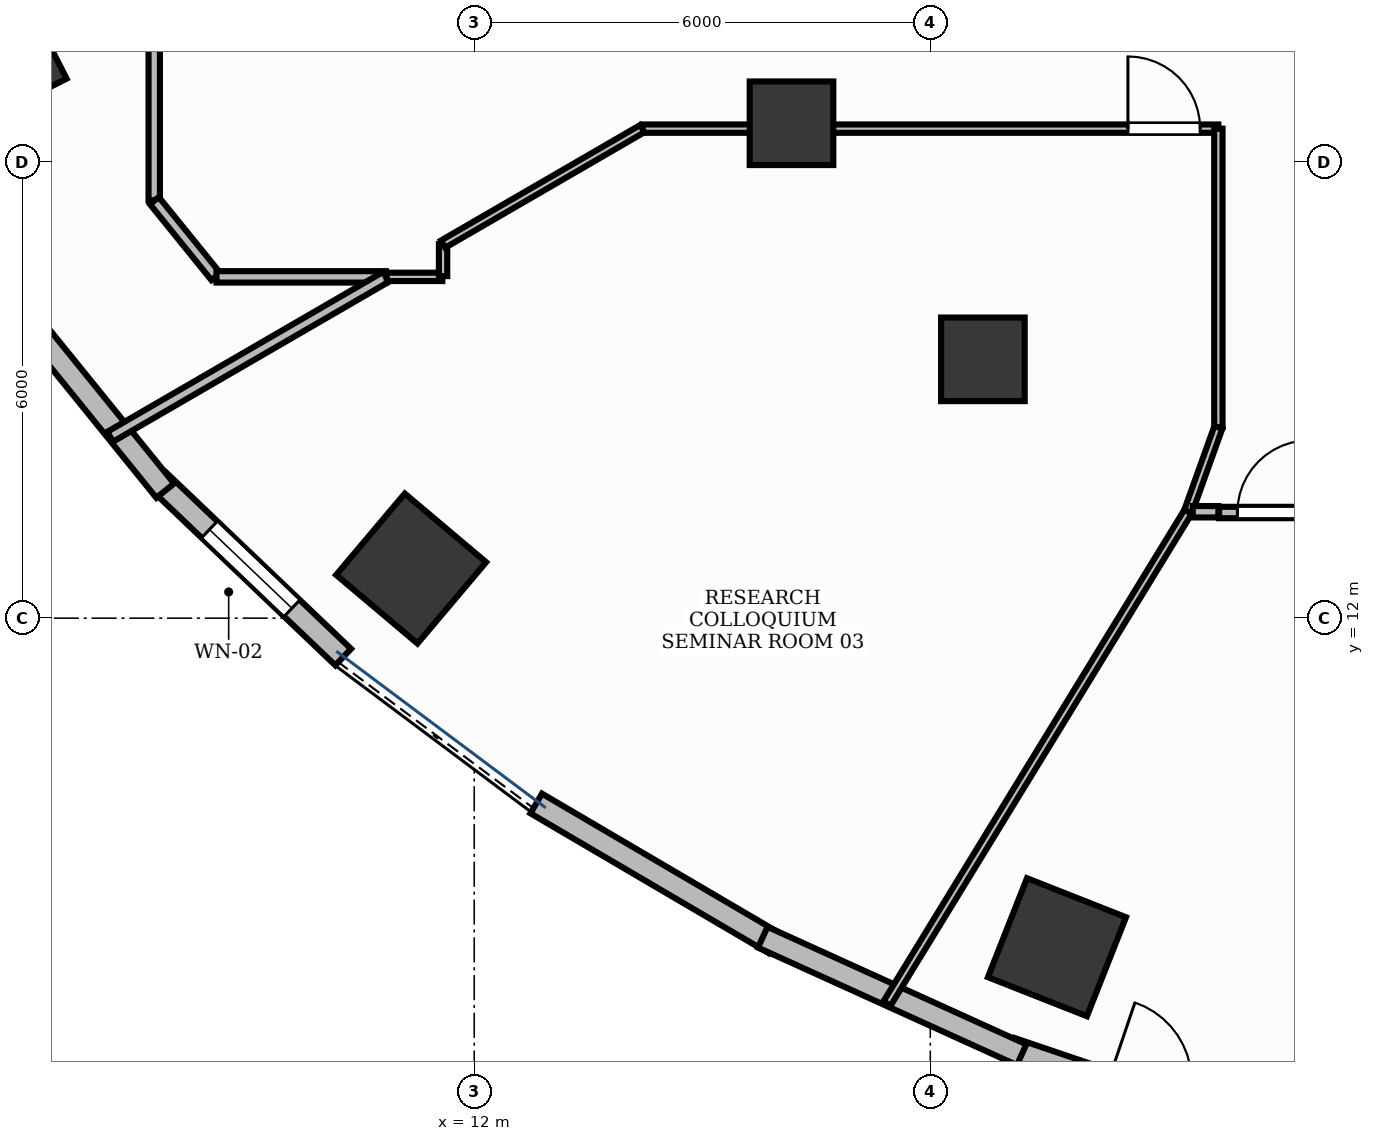
"""IFC4 building model, lengths in metres.
Left out: names, types, materials, properties, quantities, classifications, styles, units other than length and angle.
Written with IfcOpenShell. Run it as: python <this file> out.ifc"""

import sys

from ifc_helpers import new_model, si_unit, direction, frame, frame_2d, origin, origin_2d, place, context, subcontext, project, spatial, rectangle, extrude, element, fill, save


model = new_model("IFC4")
c1 = context("Model", 3, precision=1e-05, world=origin(), true_north=direction((0.0, 1.0)))
c2 = subcontext(c1, "Body", "Model", "MODEL_VIEW")
j1 = project(units=[si_unit("LENGTHUNIT", "METRE"), si_unit("PLANEANGLEUNIT", "RADIAN")], contexts=[c1])
p1 = place(None, origin())
s1 = spatial("IfcSite", under=j1, at=p1, CompositionType="ELEMENT")
p2 = place(p1, origin())
s2 = spatial("IfcBuilding", under=s1, at=p2, CompositionType="ELEMENT")
p3 = place(p2, frame((0.0, 0.0, 72.0)))
s3 = spatial("IfcBuildingStorey", under=s2, at=p3, CompositionType="ELEMENT", Elevation=72.0)
p4 = place(p3, frame((5.696, 19.404, -0.0), z_axis=(0.0, 0.0, 1.0), x_axis=(-0.453057191132, 0.891481453292, 0.0)))
e1 = element("IfcColumn", 1, at=p4, inside=s3, PredefinedType="COLUMN", context=c2, shape_type="SweptSolid", body=[
    extrude(rectangle(XDim=1.4, YDim=1.4, at=origin_2d()), origin(), (0.0, 0.0, 1.0), 3.901),
])
p5 = place(p3, frame((16.174, 18.511, -0.0), z_axis=(0.0, 0.0, 1.0), x_axis=(1.0, 0.0, 0.0)))
e2 = element("IfcColumn", 2, at=p5, inside=s3, PredefinedType="COLUMN", context=c2, shape_type="SweptSolid", body=[
    extrude(rectangle(XDim=1.1, YDim=1.1, at=origin_2d()), origin(), (0.0, 0.0, 1.0), 3.901),
])
p6 = place(p3, frame((11.17, 12.653, -0.0), z_axis=(0.0, 0.0, 1.0), x_axis=(-0.764246456939, 0.644924300253, 0.0)))
e3 = element("IfcColumn", 3, at=p6, inside=s3, PredefinedType="COLUMN", context=c2, shape_type="SweptSolid", body=[
    extrude(rectangle(XDim=1.4, YDim=1.4, at=origin_2d()), origin(), (0.0, 0.0, 1.0), 3.901),
])
p7 = place(p3, frame((18.692, 15.405, -0.0), z_axis=(0.0, 0.0, 1.0), x_axis=(1.0, 0.0, 0.0)))
e4 = element("IfcColumn", 4, at=p7, inside=s3, PredefinedType="COLUMN", context=c2, shape_type="SweptSolid", body=[
    extrude(rectangle(XDim=1.1, YDim=1.1, at=origin_2d()), origin(), (0.0, 0.0, 1.0), 3.901),
])
p8 = place(p3, frame((19.667, 7.671, -0.0), z_axis=(0.0, 0.0, 1.0), x_axis=(-0.930225540858, 0.366988341962, 0.0)))
e5 = element("IfcColumn", 5, at=p8, inside=s3, PredefinedType="COLUMN", context=c2, shape_type="SweptSolid", body=[
    extrude(rectangle(XDim=1.4, YDim=1.4, at=origin_2d()), origin(), (0.0, 0.0, 1.0), 3.901),
])
p9 = place(p3, frame((7.842, 13.809, 0.0), z_axis=(0.0, 0.0, 1.0), x_axis=(0.723678516117, -0.690137236578, 0.0)))
e6 = element("IfcWall", 6, at=p9, inside=s3, PredefinedType="STANDARD", context=c2, shape_type="SweptSolid", body=[
    extrude(rectangle(XDim=3.363, YDim=0.3, at=frame_2d((1.681, 0.0))), origin(), (0.0, 0.0, 1.0), 3.9),
])
p10 = place(p9, frame((0.931, 0.0, 0.95)))
e7 = element("IfcOpeningElement", 7, at=p10, cuts=e6, PredefinedType="OPENING", context=c2, shape_type="SweptSolid", body=[
    extrude(rectangle(XDim=1.5, YDim=1.8, at=frame_2d((0.75, 0.9))), frame((0.0, 0.165, 0.0), z_axis=(0.0, -1.0, 0.0), x_axis=(1.0, 0.0, 0.0)), (0.0, 0.0, 1.0), 0.33),
])
p11 = place(p3, frame((19.065, 6.333, 0.0), z_axis=(0.0, 0.0, 1.0), x_axis=(0.947034337234, -0.321132315564, 0.0)))
e8 = element("IfcWall", 8, at=p11, inside=s3, PredefinedType="STANDARD", context=c2, shape_type="SweptSolid", body=[
    extrude(rectangle(XDim=3.79, YDim=0.3, at=frame_2d((1.895, 0.0))), origin(), (0.0, 0.0, 1.0), 3.47),
])
p12 = place(p11, frame((1.345, 0.0, 0.0)))
e9 = element("IfcOpeningElement", 9, at=p12, cuts=e8, PredefinedType="OPENING", context=c2, shape_type="SweptSolid", body=[
    extrude(rectangle(XDim=1.1, YDim=2.15, at=frame_2d((0.55, 1.075))), frame((0.0, 0.165, 0.0), z_axis=(0.0, -1.0, 0.0), x_axis=(1.0, 0.0, 0.0)), (0.0, 0.0, 1.0), 0.33),
])
p13 = place(p3, frame((5.866, 16.233, 0.0), z_axis=(0.0, 0.0, 1.0), x_axis=(0.629221727718, -0.777225847079, 0.0)))
e10 = element("IfcWall", 10, at=p13, inside=s3, PredefinedType="STANDARD", context=c2, shape_type="SweptSolid", body=[
    extrude(rectangle(XDim=3.288, YDim=0.3, at=frame_2d((1.644, 0.0))), origin(), (0.0, 0.0, 1.0), 3.9),
])
p14 = place(p3, frame((12.815, 9.562, 0.0), z_axis=(0.0, 0.0, 1.0), x_axis=(0.8624654944, -0.506115867139, 0.0)))
e11 = element("IfcWall", 11, at=p14, inside=s3, PredefinedType="STANDARD", context=c2, shape_type="SweptSolid", body=[
    extrude(rectangle(XDim=3.635, YDim=0.3, at=frame_2d((1.818, 0.0))), origin(), (0.0, 0.0, 1.0), 3.9),
])
p15 = place(p3, frame((15.796, 7.802, 0.0), z_axis=(0.0, 0.0, 1.0), x_axis=(0.910623406862, -0.413237233166, 0.0)))
e12 = element("IfcWall", 12, at=p15, inside=s3, PredefinedType="STANDARD", context=c2, shape_type="SweptSolid", body=[
    extrude(rectangle(XDim=3.74, YDim=0.3, at=frame_2d((1.87, 0.0))), origin(), (0.0, 0.0, 1.0), 3.9),
])
p16 = place(p3, frame((7.79, 31.115, 0.0), z_axis=(0.0, 0.0, 1.0), x_axis=(0.0, -1.0, 0.0)))
e13 = element("IfcWall", 13, at=p16, inside=s3, PredefinedType="PARTITIONING", context=c2, shape_type="SweptSolid", body=[
    extrude(rectangle(XDim=13.617, YDim=0.15, at=frame_2d((6.808, 0.0))), origin(), (0.0, 0.0, 1.0), 2.91),
])
p17 = place(p16, frame((0.24, 0.0, 0.0)))
e14 = element("IfcOpeningElement", 14, at=p17, cuts=e13, PredefinedType="OPENING", context=c2, shape_type="SweptSolid", body=[
    extrude(rectangle(XDim=0.95, YDim=2.15, at=frame_2d((0.475, 1.075))), frame((0.0, 0.09, 0.0), z_axis=(0.0, -1.0, 0.0), x_axis=(1.0, 0.0, 0.0)), (0.0, 0.0, 1.0), 0.18),
])
p18 = place(p3, frame((14.211, 18.44, 0.0), z_axis=(0.0, 0.0, 1.0), x_axis=(1.0, 0.0, 0.0)))
e15 = element("IfcWall", 15, at=p18, inside=s3, PredefinedType="MOVABLE", context=c2, shape_type="SweptSolid", body=[
    extrude(rectangle(XDim=7.579, YDim=0.11, at=frame_2d((3.79, 0.0))), origin(), (0.0, 0.0, 1.0), 2.91),
])
p19 = place(p18, frame((6.389, 0.0, 0.0)))
e16 = element("IfcOpeningElement", 16, at=p19, cuts=e15, PredefinedType="OPENING", context=c2, shape_type="SweptSolid", body=[
    extrude(rectangle(XDim=0.95, YDim=2.15, at=frame_2d((0.475, 1.075))), frame((0.0, 0.07, 0.0), z_axis=(0.0, -1.0, 0.0), x_axis=(1.0, 0.0, 0.0)), (0.0, 0.0, 1.0), 0.14),
])
p20 = place(p3, frame((21.8, 13.39, 0.0), z_axis=(0.0, 0.0, 1.0), x_axis=(1.0, 0.0, 0.0)))
e17 = element("IfcWall", 17, at=p20, inside=s3, PredefinedType="PARTITIONING", context=c2, shape_type="SweptSolid", body=[
    extrude(rectangle(XDim=6.7, YDim=0.15, at=frame_2d((3.35, 0.0))), origin(), (0.0, 0.0, 1.0), 2.91),
])
p21 = place(p20, frame((0.24, 0.0, 0.0)))
e18 = element("IfcOpeningElement", 18, at=p21, cuts=e17, PredefinedType="OPENING", context=c2, shape_type="SweptSolid", body=[
    extrude(rectangle(XDim=0.95, YDim=2.15, at=frame_2d((0.475, 1.075))), frame((0.0, 0.09, 0.0), z_axis=(0.0, -1.0, 0.0), x_axis=(1.0, 0.0, 0.0)), (0.0, 0.0, 1.0), 0.18),
])
p22 = place(p3, frame((7.792, 17.492, 0.0), z_axis=(0.0, 0.0, 1.0), x_axis=(0.629225554682, -0.777222748854, 0.0)))
e19 = element("IfcWall", 19, at=p22, inside=s3, PredefinedType="PARTITIONING", context=c2, shape_type="SweptSolid", body=[
    extrude(rectangle(XDim=1.285, YDim=0.15, at=frame_2d((0.643, 0.0))), origin(), (0.0, 0.0, 1.0), 2.91),
])
p23 = place(p3, frame((8.609, 16.49, 0.0), z_axis=(0.0, 0.0, 1.0), x_axis=(1.0, 0.0, 0.0)))
e20 = element("IfcWall", 20, at=p23, inside=s3, PredefinedType="PARTITIONING", context=c2, shape_type="SweptSolid", body=[
    extrude(rectangle(XDim=2.23, YDim=0.15, at=frame_2d((1.115, 0.0))), origin(), (0.0, 0.0, 1.0), 2.91),
])
p24 = place(p3, frame((10.839, 16.49, 0.0), z_axis=(0.0, 0.0, 1.0), x_axis=(-0.865171113314, -0.501476763856, 0.0)))
e21 = element("IfcWall", 21, at=p24, inside=s3, PredefinedType="PARTITIONING", context=c2, shape_type="SweptSolid", body=[
    extrude(rectangle(XDim=4.194, YDim=0.15, at=frame_2d((2.097, 0.0))), origin(), (0.0, 0.0, 1.0), 2.91),
])
p25 = place(p3, frame((21.79, 18.44, 0.0), z_axis=(0.0, 0.0, 1.0), x_axis=(0.0, -1.0, 0.0)))
e22 = element("IfcWall", 22, at=p25, inside=s3, PredefinedType="MOVABLE", context=c2, shape_type="SweptSolid", body=[
    extrude(rectangle(XDim=3.929, YDim=0.11, at=frame_2d((1.964, 0.0))), origin(), (0.0, 0.0, 1.0), 2.91),
])
p26 = place(p3, frame((21.79, 14.511, 0.0), z_axis=(0.0, 0.0, 1.0), x_axis=(-0.337672177142, -0.941263778536, 0.0)))
e23 = element("IfcWall", 23, at=p26, inside=s3, PredefinedType="MOVABLE", context=c2, shape_type="SweptSolid", body=[
    extrude(rectangle(XDim=1.181, YDim=0.11, at=frame_2d((0.59, 0.0))), origin(), (0.0, 0.0, 1.0), 2.91),
])
p27 = place(p3, frame((21.391, 13.4, 0.0), z_axis=(0.0, 0.0, 1.0), x_axis=(-0.522118984401, -0.852872655282, 0.0)))
e24 = element("IfcWall", 24, at=p27, inside=s3, PredefinedType="MOVABLE", context=c2, shape_type="SweptSolid", body=[
    extrude(rectangle(XDim=7.586, YDim=0.11, at=frame_2d((3.793, 0.0))), origin(), (0.0, 0.0, 1.0), 2.91),
])
p28 = place(p3, frame((10.849, 16.49, 0.0), z_axis=(0.0, 0.0, 1.0), x_axis=(1.0, 0.0, 0.0)))
e25 = element("IfcWall", 25, at=p28, inside=s3, PredefinedType="MOVABLE", context=c2, shape_type="SweptSolid", body=[
    extrude(rectangle(XDim=0.731, YDim=0.11, at=frame_2d((0.366, 0.0))), origin(), (0.0, 0.0, 1.0), 2.91),
])
p29 = place(p3, frame((11.59, 16.5, 0.0), z_axis=(0.0, 0.0, 1.0), x_axis=(0.0, 1.0, 0.0)))
e26 = element("IfcWall", 26, at=p29, inside=s3, PredefinedType="MOVABLE", context=c2, shape_type="SweptSolid", body=[
    extrude(rectangle(XDim=0.421, YDim=0.11, at=frame_2d((0.21, 0.0))), origin(), (0.0, 0.0, 1.0), 2.91),
])
p30 = place(p3, frame((11.59, 16.921, 0.0), z_axis=(0.0, 0.0, 1.0), x_axis=(0.865161287927, 0.50149371469, 0.0)))
e27 = element("IfcWall", 27, at=p30, inside=s3, PredefinedType="MOVABLE", context=c2, shape_type="SweptSolid", body=[
    extrude(rectangle(XDim=3.029, YDim=0.11, at=frame_2d((1.515, 0.0))), origin(), (0.0, 0.0, 1.0), 2.91),
])
p31 = place(p3, frame((21.453, 13.4, 0.0), z_axis=(0.0, 0.0, 1.0), x_axis=(1.0, 0.0, 0.0)))
e28 = element("IfcWall", 28, at=p31, inside=s3, PredefinedType="PARTITIONING", context=c2, shape_type="SweptSolid", body=[
    extrude(rectangle(XDim=0.337, YDim=0.15, at=frame_2d((0.168, 0.0))), origin(), (0.0, 0.0, 1.0), 2.91),
])
p32 = place(p10, origin())
e29 = element("IfcWindow", 29, at=p32, inside=s3, PartitioningType="DOUBLE_PANEL_VERTICAL", PredefinedType="WINDOW", context=c2, shape_type="SweptSolid", body=[
    extrude(rectangle(XDim=1.5, YDim=1.8, at=frame_2d((0.75, 0.9))), frame((0.0, 0.03, 0.0), z_axis=(0.0, -1.0, 0.0), x_axis=(1.0, 0.0, 0.0)), (0.0, 0.0, 1.0), 0.06),
])
fill(e7, e29)
p33 = place(p19, origin())
e30 = element("IfcDoor", 30, at=p33, inside=s3, OperationType="SINGLE_SWING_LEFT", PredefinedType="DOOR", context=c2, shape_type="SweptSolid", body=[
    extrude(rectangle(XDim=0.95, YDim=2.15, at=frame_2d((0.475, 1.075))), frame((0.0, 0.025, 0.0), z_axis=(0.0, -1.0, 0.0), x_axis=(1.0, 0.0, 0.0)), (0.0, 0.0, 1.0), 0.05),
])
fill(e16, e30)
p34 = place(p21, origin())
e31 = element("IfcDoor", 31, at=p34, inside=s3, OperationType="SINGLE_SWING_RIGHT", PredefinedType="DOOR", context=c2, shape_type="SweptSolid", body=[
    extrude(rectangle(XDim=0.95, YDim=2.15, at=frame_2d((0.475, 1.075))), frame((0.0, 0.025, 0.0), z_axis=(0.0, -1.0, 0.0), x_axis=(1.0, 0.0, 0.0)), (0.0, 0.0, 1.0), 0.05),
])
fill(e18, e31)
save(model, sys.argv[1])
